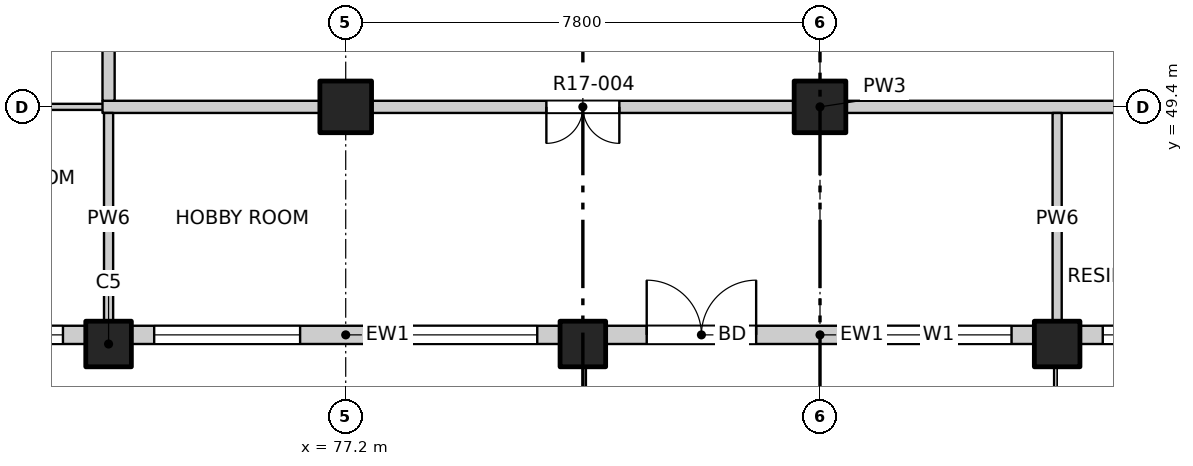
"""IFC4 building model, lengths in metres.
Left out: names, types, materials, properties, quantities, classifications, styles, units other than length and angle.
Written with IfcOpenShell. Run it as: python <this file> out.ifc"""

import sys

from ifc_helpers import new_model, si_unit, direction, frame, frame_2d, origin, origin_2d, place, context, subcontext, project, spatial, rectangle, extrude, element, fill, save


model = new_model("IFC4")
c1 = context("Model", 3, precision=1e-05, world=origin(), true_north=direction((0.0, 1.0)))
c2 = subcontext(c1, "Body", "Model", "MODEL_VIEW")
j1 = project(units=[si_unit("LENGTHUNIT", "METRE"), si_unit("PLANEANGLEUNIT", "RADIAN")], contexts=[c1])
p1 = place(None, origin())
s1 = spatial("IfcSite", under=j1, at=p1, CompositionType="ELEMENT")
p2 = place(p1, origin())
s2 = spatial("IfcBuilding", under=s1, at=p2, CompositionType="ELEMENT")
p3 = place(p2, frame((0.0, 0.0, 182.6)))
s3 = spatial("IfcBuildingStorey", under=s2, at=p3, CompositionType="ELEMENT", Elevation=182.6)
for number, where, z_axis, x_axis in (
    (1, (73.3, 45.5, -0.25), (0.0, 0.0, 1.0), (1.0, 0.0, 0.0)),
    (2, (81.1, 45.5, -0.25), (0.0, 0.0, 1.0), (1.0, 0.0, 0.0)),
    (3, (88.9, 45.5, -0.25), (0.0, 0.0, 1.0), (1.0, 0.0, 0.0)),
):
    element("IfcColumn", number, at=place(p3, frame(where, z_axis=z_axis, x_axis=x_axis)), inside=s3, PredefinedType="COLUMN", context=c2, shape_type="SweptSolid", body=[
        extrude(rectangle(XDim=0.75, YDim=0.75, at=origin_2d()), origin(), (0.0, 0.0, 1.0), 3.4),
    ])
for number, where, z_axis, x_axis in (
    (4, (77.2, 49.4, -0.25), (0.0, 0.0, 1.0), (1.0, 0.0, 0.0)),
    (5, (85.0, 49.4, -0.25), (0.0, 0.0, 1.0), (1.0, 0.0, 0.0)),
):
    element("IfcColumn", number, at=place(p3, frame(where, z_axis=z_axis, x_axis=x_axis)), inside=s3, PredefinedType="COLUMN", context=c2, shape_type="SweptSolid", body=[
        extrude(rectangle(XDim=0.85, YDim=0.85, at=origin_2d()), origin(), (0.0, 0.0, 1.0), 3.4),
    ])
p4 = place(p3, frame((69.4, 45.65, 0.0), z_axis=(0.0, 0.0, 1.0), x_axis=(1.0, 0.0, 0.0)))
e6 = element("IfcWall", 6, at=p4, inside=s3, PredefinedType="SOLIDWALL", context=c2, shape_type="SweptSolid", body=[
    extrude(rectangle(XDim=3.525, YDim=0.3, at=frame_2d((1.763, 0.0))), origin(), (0.0, 0.0, 1.0), 2.7),
])
p5 = place(p4, frame((0.75, 0.0, 0.9)))
e7 = element("IfcOpeningElement", 7, at=p5, cuts=e6, PredefinedType="OPENING", context=c2, shape_type="SweptSolid", body=[
    extrude(rectangle(XDim=2.4, YDim=1.8, at=frame_2d((1.2, 0.9))), frame((0.0, 0.16, 0.0), z_axis=(0.0, -1.0, 0.0), x_axis=(1.0, 0.0, 0.0)), (0.0, 0.0, 1.0), 0.32),
])
p6 = place(p3, frame((73.675, 45.65, 0.0), z_axis=(0.0, 0.0, 1.0), x_axis=(1.0, 0.0, 0.0)))
e8 = element("IfcWall", 8, at=p6, inside=s3, PredefinedType="SOLIDWALL", context=c2, shape_type="SweptSolid", body=[
    extrude(rectangle(XDim=7.05, YDim=0.3, at=frame_2d((3.525, 0.0))), origin(), (0.0, 0.0, 1.0), 2.7),
])
p7 = place(p6, frame((0.375, 0.0, 0.9)))
e9 = element("IfcOpeningElement", 9, at=p7, cuts=e8, PredefinedType="OPENING", context=c2, shape_type="SweptSolid", body=[
    extrude(rectangle(XDim=2.4, YDim=1.8, at=frame_2d((1.2, 0.9))), frame((0.0, 0.16, 0.0), z_axis=(0.0, -1.0, 0.0), x_axis=(1.0, 0.0, 0.0)), (0.0, 0.0, 1.0), 0.32),
])
p8 = place(p6, frame((4.275, 0.0, 0.9)))
e10 = element("IfcOpeningElement", 10, at=p8, cuts=e8, PredefinedType="OPENING", context=c2, shape_type="SweptSolid", body=[
    extrude(rectangle(XDim=2.4, YDim=1.8, at=frame_2d((1.2, 0.9))), frame((0.0, 0.16, 0.0), z_axis=(0.0, -1.0, 0.0), x_axis=(1.0, 0.0, 0.0)), (0.0, 0.0, 1.0), 0.32),
])
p9 = place(p3, frame((81.475, 45.65, 0.0), z_axis=(0.0, 0.0, 1.0), x_axis=(1.0, 0.0, 0.0)))
e11 = element("IfcWall", 11, at=p9, inside=s3, PredefinedType="SOLIDWALL", context=c2, shape_type="SweptSolid", body=[
    extrude(rectangle(XDim=7.05, YDim=0.3, at=frame_2d((3.525, 0.0))), origin(), (0.0, 0.0, 1.0), 2.7),
])
p10 = place(p9, frame((0.675, 0.0, 0.0)))
e12 = element("IfcOpeningElement", 12, at=p10, cuts=e11, PredefinedType="OPENING", context=c2, shape_type="SweptSolid", body=[
    extrude(rectangle(XDim=1.8, YDim=2.4, at=frame_2d((0.9, 1.2))), frame((0.0, 0.16, 0.0), z_axis=(0.0, -1.0, 0.0), x_axis=(1.0, 0.0, 0.0)), (0.0, 0.0, 1.0), 0.32),
])
p11 = place(p9, frame((4.275, 0.0, 0.9)))
e13 = element("IfcOpeningElement", 13, at=p11, cuts=e11, PredefinedType="OPENING", context=c2, shape_type="SweptSolid", body=[
    extrude(rectangle(XDim=2.4, YDim=1.8, at=frame_2d((1.2, 0.9))), frame((0.0, 0.16, 0.0), z_axis=(0.0, -1.0, 0.0), x_axis=(1.0, 0.0, 0.0)), (0.0, 0.0, 1.0), 0.32),
])
p12 = place(p3, frame((89.275, 45.65, 0.0), z_axis=(0.0, 0.0, 1.0), x_axis=(1.0, 0.0, 0.0)))
e14 = element("IfcWall", 14, at=p12, inside=s3, PredefinedType="SOLIDWALL", context=c2, shape_type="SweptSolid", body=[
    extrude(rectangle(XDim=7.05, YDim=0.3, at=frame_2d((3.525, 0.0))), origin(), (0.0, 0.0, 1.0), 2.7),
])
p13 = place(p12, frame((0.375, 0.0, 0.9)))
e15 = element("IfcOpeningElement", 15, at=p13, cuts=e14, PredefinedType="OPENING", context=c2, shape_type="SweptSolid", body=[
    extrude(rectangle(XDim=2.4, YDim=1.8, at=frame_2d((1.2, 0.9))), frame((0.0, 0.16, 0.0), z_axis=(0.0, -1.0, 0.0), x_axis=(1.0, 0.0, 0.0)), (0.0, 0.0, 1.0), 0.32),
])
p14 = place(p12, frame((4.275, 0.0, 0.9)))
e16 = element("IfcOpeningElement", 16, at=p14, cuts=e14, PredefinedType="OPENING", context=c2, shape_type="SweptSolid", body=[
    extrude(rectangle(XDim=2.4, YDim=1.8, at=frame_2d((1.2, 0.9))), frame((0.0, 0.16, 0.0), z_axis=(0.0, -1.0, 0.0), x_axis=(1.0, 0.0, 0.0)), (0.0, 0.0, 1.0), 0.32),
])
p15 = place(p3, frame((65.8, 49.4, 0.0), z_axis=(0.0, 0.0, 1.0), x_axis=(1.0, 0.0, 0.0)))
e17 = element("IfcWall", 17, at=p15, inside=s3, PredefinedType="PARTITIONING", context=c2, shape_type="SweptSolid", body=[
    extrude(rectangle(XDim=7.6, YDim=0.1, at=frame_2d((3.8, 0.0))), origin(), (0.0, 0.0, 1.0), 3.15),
])
p16 = place(p15, frame((4.14, 0.0, 0.0)))
e18 = element("IfcOpeningElement", 18, at=p16, cuts=e17, PredefinedType="OPENING", context=c2, shape_type="SweptSolid", body=[
    extrude(rectangle(XDim=0.9, YDim=2.1, at=frame_2d((0.45, 1.05))), frame((0.0, 0.06, 0.0), z_axis=(0.0, -1.0, 0.0), x_axis=(1.0, 0.0, 0.0)), (0.0, 0.0, 1.0), 0.12),
])
p17 = place(p3, frame((73.2, 49.4, 0.0), z_axis=(0.0, 0.0, 1.0), x_axis=(1.0, 0.0, 0.0)))
e19 = element("IfcWall", 19, at=p17, inside=s3, PredefinedType="PARTITIONING", context=c2, shape_type="SweptSolid", body=[
    extrude(rectangle(XDim=23.6, YDim=0.2, at=frame_2d((11.8, 0.0))), origin(), (0.0, 0.0, 1.0), 3.15),
])
p18 = place(p17, frame((7.3, 0.0, 0.0)))
e20 = element("IfcOpeningElement", 20, at=p18, cuts=e19, PredefinedType="OPENING", context=c2, shape_type="SweptSolid", body=[
    extrude(rectangle(XDim=1.2, YDim=2.1, at=frame_2d((0.6, 1.05))), frame((0.0, 0.11, 0.0), z_axis=(0.0, -1.0, 0.0), x_axis=(1.0, 0.0, 0.0)), (0.0, 0.0, 1.0), 0.22),
])
p19 = place(p17, frame((20.125, 0.0, 0.0)))
e21 = element("IfcOpeningElement", 21, at=p19, cuts=e19, PredefinedType="OPENING", context=c2, shape_type="SweptSolid", body=[
    extrude(rectangle(XDim=1.2, YDim=2.1, at=frame_2d((0.6, 1.05))), frame((0.0, 0.11, 0.0), z_axis=(0.0, -1.0, 0.0), x_axis=(1.0, 0.0, 0.0)), (0.0, 0.0, 1.0), 0.22),
])
p20 = place(p3, frame((73.3, 45.8, 0.0), z_axis=(0.0, 0.0, 1.0), x_axis=(0.0, 1.0, 0.0)))
e22 = element("IfcWall", 22, at=p20, inside=s3, PredefinedType="PARTITIONING", context=c2, shape_type="SweptSolid", body=[
    extrude(rectangle(XDim=3.5, YDim=0.15, at=frame_2d((1.75, 0.0))), origin(), (0.0, 0.0, 1.0), 3.15),
])
p21 = place(p3, frame((73.3, 49.5, 0.0), z_axis=(0.0, 0.0, 1.0), x_axis=(0.0, 1.0, 0.0)))
e23 = element("IfcWall", 23, at=p21, inside=s3, PredefinedType="PARTITIONING", context=c2, shape_type="SweptSolid", body=[
    extrude(rectangle(XDim=34.7, YDim=0.2, at=frame_2d((17.35, 0.0))), origin(), (0.0, 0.0, 1.0), 3.15),
])
p22 = place(p21, frame((10.575, 0.0, 0.0)))
e24 = element("IfcOpeningElement", 24, at=p22, cuts=e23, PredefinedType="OPENING", context=c2, shape_type="SweptSolid", body=[
    extrude(rectangle(XDim=1.0, YDim=2.1, at=frame_2d((0.5, 1.05))), frame((0.0, 0.11, 0.0), z_axis=(0.0, -1.0, 0.0), x_axis=(1.0, 0.0, 0.0)), (0.0, 0.0, 1.0), 0.22),
])
p23 = place(p21, frame((18.825, 0.0, 0.0)))
e25 = element("IfcOpeningElement", 25, at=p23, cuts=e23, PredefinedType="OPENING", context=c2, shape_type="SweptSolid", body=[
    extrude(rectangle(XDim=1.0, YDim=2.1, at=frame_2d((0.5, 1.05))), frame((0.0, 0.11, 0.0), z_axis=(0.0, -1.0, 0.0), x_axis=(1.0, 0.0, 0.0)), (0.0, 0.0, 1.0), 0.22),
])
p24 = place(p21, frame((29.075, 0.0, 0.0)))
e26 = element("IfcOpeningElement", 26, at=p24, cuts=e23, PredefinedType="OPENING", context=c2, shape_type="SweptSolid", body=[
    extrude(rectangle(XDim=1.0, YDim=2.1, at=frame_2d((0.5, 1.05))), frame((0.0, 0.11, 0.0), z_axis=(0.0, -1.0, 0.0), x_axis=(1.0, 0.0, 0.0)), (0.0, 0.0, 1.0), 0.22),
])
p25 = place(p3, frame((88.9, 45.8, 0.0), z_axis=(0.0, 0.0, 1.0), x_axis=(0.0, 1.0, 0.0)))
e27 = element("IfcWall", 27, at=p25, inside=s3, PredefinedType="PARTITIONING", context=c2, shape_type="SweptSolid", body=[
    extrude(rectangle(XDim=3.5, YDim=0.15, at=frame_2d((1.75, 0.0))), origin(), (0.0, 0.0, 1.0), 3.15),
])
p26 = place(p5, origin())
e28 = element("IfcWindow", 28, at=p26, inside=s3, PartitioningType="DOUBLE_PANEL_VERTICAL", PredefinedType="WINDOW", context=c2, shape_type="SweptSolid", body=[
    extrude(rectangle(XDim=2.4, YDim=1.8, at=frame_2d((1.2, 0.9))), frame((0.0, 0.03, 0.0), z_axis=(0.0, -1.0, 0.0), x_axis=(1.0, 0.0, 0.0)), (0.0, 0.0, 1.0), 0.06),
])
fill(e7, e28)
p27 = place(p7, origin())
e29 = element("IfcWindow", 29, at=p27, inside=s3, PartitioningType="DOUBLE_PANEL_VERTICAL", PredefinedType="WINDOW", context=c2, shape_type="SweptSolid", body=[
    extrude(rectangle(XDim=2.4, YDim=1.8, at=frame_2d((1.2, 0.9))), frame((0.0, 0.03, 0.0), z_axis=(0.0, -1.0, 0.0), x_axis=(1.0, 0.0, 0.0)), (0.0, 0.0, 1.0), 0.06),
])
fill(e9, e29)
p28 = place(p8, origin())
e30 = element("IfcWindow", 30, at=p28, inside=s3, PartitioningType="DOUBLE_PANEL_VERTICAL", PredefinedType="WINDOW", context=c2, shape_type="SweptSolid", body=[
    extrude(rectangle(XDim=2.4, YDim=1.8, at=frame_2d((1.2, 0.9))), frame((0.0, 0.03, 0.0), z_axis=(0.0, -1.0, 0.0), x_axis=(1.0, 0.0, 0.0)), (0.0, 0.0, 1.0), 0.06),
])
fill(e10, e30)
p29 = place(p10, origin())
e31 = element("IfcDoor", 31, at=p29, inside=s3, OperationType="DOUBLE_DOOR_SINGLE_SWING", PredefinedType="DOOR", context=c2, shape_type="SweptSolid", body=[
    extrude(rectangle(XDim=1.8, YDim=2.4, at=frame_2d((0.9, 1.2))), frame((0.0, 0.025, 0.0), z_axis=(0.0, -1.0, 0.0), x_axis=(1.0, 0.0, 0.0)), (0.0, 0.0, 1.0), 0.05),
])
fill(e12, e31)
p30 = place(p11, origin())
e32 = element("IfcWindow", 32, at=p30, inside=s3, PartitioningType="DOUBLE_PANEL_VERTICAL", PredefinedType="WINDOW", context=c2, shape_type="SweptSolid", body=[
    extrude(rectangle(XDim=2.4, YDim=1.8, at=frame_2d((1.2, 0.9))), frame((0.0, 0.03, 0.0), z_axis=(0.0, -1.0, 0.0), x_axis=(1.0, 0.0, 0.0)), (0.0, 0.0, 1.0), 0.06),
])
fill(e13, e32)
p31 = place(p13, origin())
e33 = element("IfcWindow", 33, at=p31, inside=s3, PartitioningType="DOUBLE_PANEL_VERTICAL", PredefinedType="WINDOW", context=c2, shape_type="SweptSolid", body=[
    extrude(rectangle(XDim=2.4, YDim=1.8, at=frame_2d((1.2, 0.9))), frame((0.0, 0.03, 0.0), z_axis=(0.0, -1.0, 0.0), x_axis=(1.0, 0.0, 0.0)), (0.0, 0.0, 1.0), 0.06),
])
fill(e15, e33)
p32 = place(p18, origin())
e34 = element("IfcDoor", 34, at=p32, inside=s3, OperationType="DOUBLE_DOOR_SINGLE_SWING", PredefinedType="DOOR", context=c2, shape_type="SweptSolid", body=[
    extrude(rectangle(XDim=1.2, YDim=2.1, at=frame_2d((0.6, 1.05))), frame((0.0, 0.025, 0.0), z_axis=(0.0, -1.0, 0.0), x_axis=(1.0, 0.0, 0.0)), (0.0, 0.0, 1.0), 0.05),
])
fill(e20, e34)
save(model, sys.argv[1])
